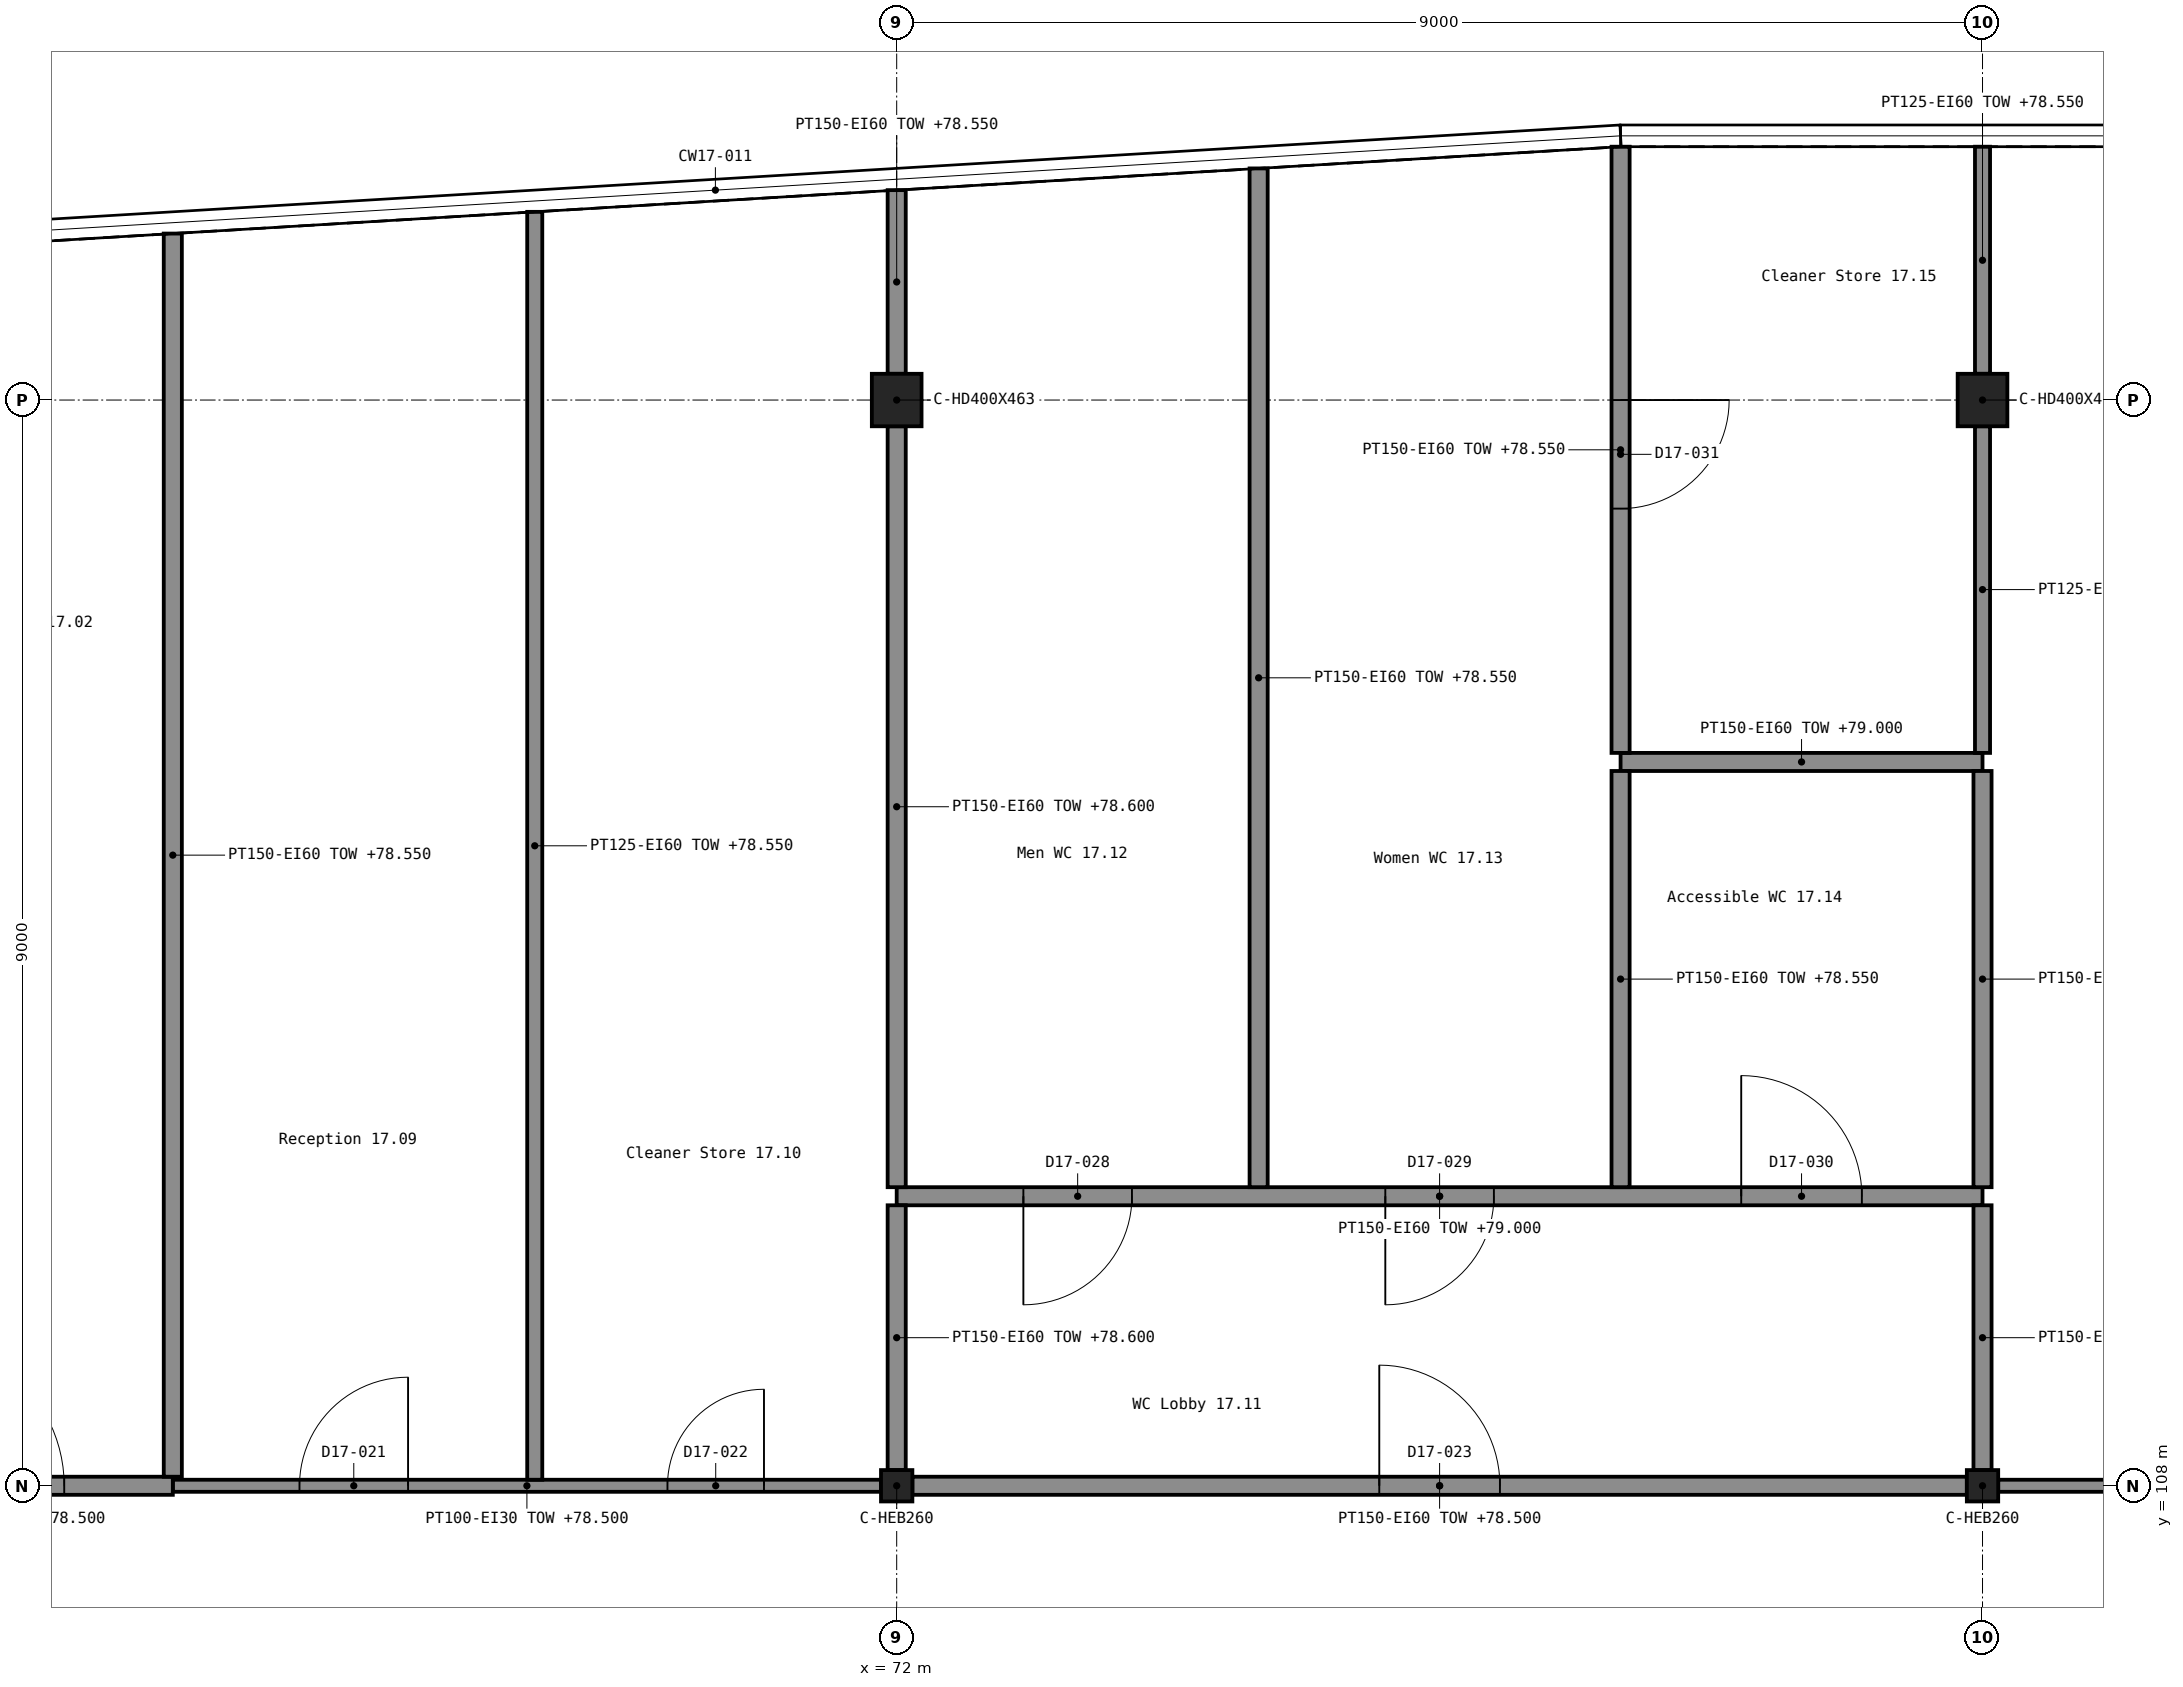
"""IFC4 building model, lengths in metres.
Left out: names, types, materials, properties, quantities, classifications, styles, units other than length and angle.
Written with IfcOpenShell. Run it as: python <this file> out.ifc"""

import sys

from ifc_helpers import new_model, si_unit, direction, frame, frame_2d, origin, origin_2d, place, context, subcontext, project, spatial, rectangle, i_section, extrude, element, fill, save


model = new_model("IFC4")
c1 = context("Model", 3, precision=1e-05, world=origin(), true_north=direction((0.0, 1.0)))
c2 = subcontext(c1, "Body", "Model", "MODEL_VIEW")
j1 = project(units=[si_unit("LENGTHUNIT", "METRE"), si_unit("PLANEANGLEUNIT", "RADIAN")], contexts=[c1])
p1 = place(None, origin())
s1 = spatial("IfcSite", under=j1, at=p1, CompositionType="ELEMENT")
p2 = place(p1, origin())
s2 = spatial("IfcBuilding", under=s1, at=p2, CompositionType="ELEMENT")
p3 = place(p2, frame((0.0, 0.0, 75.3)))
s3 = spatial("IfcBuildingStorey", under=s2, at=p3, CompositionType="ELEMENT", Elevation=75.3)
for number, where, z_axis, x_axis in (
    (1, (72.0, 108.0, 0.0), (0.0, 0.0, 1.0), (1.0, 0.0, 0.0)),
    (2, (81.0, 108.0, 0.0), (0.0, 0.0, 1.0), (1.0, 0.0, 0.0)),
):
    element("IfcColumn", number, at=place(p3, frame(where, z_axis=z_axis, x_axis=x_axis)), inside=s3, PredefinedType="COLUMN", context=c2, shape_type="SweptSolid", body=[
        extrude(i_section(OverallWidth=0.26, OverallDepth=0.26, WebThickness=0.01, FlangeThickness=0.018, FilletRadius=0.024, at=origin_2d()), origin(), (0.0, 0.0, 1.0), 3.9),
    ])
for number, where, z_axis, x_axis in (
    (3, (72.0, 117.0, 0.0), (0.0, 0.0, 1.0), (1.0, 0.0, 0.0)),
    (4, (81.0, 117.0, 0.0), (0.0, 0.0, 1.0), (1.0, 0.0, 0.0)),
):
    element("IfcColumn", number, at=place(p3, frame(where, z_axis=z_axis, x_axis=x_axis)), inside=s3, PredefinedType="COLUMN", context=c2, shape_type="SweptSolid", body=[
        extrude(i_section(OverallWidth=0.412, OverallDepth=0.435, WebThickness=0.036, FlangeThickness=0.057, FilletRadius=0.015, at=origin_2d()), origin(), (0.0, 0.0, 1.0), 3.9),
    ])
p4 = place(p3, frame((83.999, 118.975, 3.9), z_axis=(0.0, 0.0, 1.0), x_axis=(-1.0, 0.0, 0.0)))
e5 = element("IfcWall", 5, at=p4, inside=s3, PredefinedType="PARAPET", context=c2, shape_type="SweptSolid", body=[
    extrude(rectangle(XDim=2.999, YDim=0.25, at=frame_2d((1.5, 0.0))), origin(), (0.0, 0.0, 1.0), 2.9),
])
p5 = place(p3, frame((80.999, 118.975, 3.9), z_axis=(0.0, 0.0, 1.0), x_axis=(-1.0, 0.0, 0.0)))
e6 = element("IfcWall", 6, at=p5, inside=s3, PredefinedType="PARAPET", context=c2, shape_type="SweptSolid", body=[
    extrude(rectangle(XDim=2.999, YDim=0.25, at=frame_2d((1.5, 0.0))), origin(), (0.0, 0.0, 1.0), 3.3),
])
p6 = place(p3, frame((78.004, 118.975, 3.9), z_axis=(0.0, 0.0, 1.0), x_axis=(-0.998203971819, -0.059906849736, 0.0)))
e7 = element("IfcWall", 7, at=p6, inside=s3, PredefinedType="PARAPET", context=c2, shape_type="SweptSolid", body=[
    extrude(rectangle(XDim=3.008, YDim=0.25, at=frame_2d((1.504, 0.0))), origin(), (0.0, 0.0, 1.0), 3.5),
])
p7 = place(p3, frame((75.001, 118.795, 3.9), z_axis=(0.0, 0.0, 1.0), x_axis=(-0.998203971819, -0.059906849736, 0.0)))
e8 = element("IfcWall", 8, at=p7, inside=s3, PredefinedType="PARAPET", context=c2, shape_type="SweptSolid", body=[
    extrude(rectangle(XDim=3.008, YDim=0.25, at=frame_2d((1.504, 0.0))), origin(), (0.0, 0.0, 1.0), 3.6),
])
p8 = place(p3, frame((71.999, 118.615, 3.9), z_axis=(0.0, 0.0, 1.0), x_axis=(-0.998203971819, -0.059906849736, 0.0)))
e9 = element("IfcWall", 9, at=p8, inside=s3, PredefinedType="PARAPET", context=c2, shape_type="SweptSolid", body=[
    extrude(rectangle(XDim=3.008, YDim=0.25, at=frame_2d((1.504, 0.0))), origin(), (0.0, 0.0, 1.0), 3.4),
])
p9 = place(p3, frame((68.997, 118.435, 3.9), z_axis=(0.0, 0.0, 1.0), x_axis=(-0.998203971819, -0.059906849736, 0.0)))
e10 = element("IfcWall", 10, at=p9, inside=s3, PredefinedType="PARAPET", context=c2, shape_type="SweptSolid", body=[
    extrude(rectangle(XDim=3.008, YDim=0.25, at=frame_2d((1.504, 0.0))), origin(), (0.0, 0.0, 1.0), 3.1),
])
p10 = place(p3, frame((65.995, 118.254, 3.9), z_axis=(0.0, 0.0, 1.0), x_axis=(-0.998208822746, -0.059825965875, 0.0)))
e11 = element("IfcWall", 11, at=p10, inside=s3, PredefinedType="PARAPET", context=c2, shape_type="SweptSolid", body=[
    extrude(rectangle(XDim=3.008, YDim=0.25, at=frame_2d((1.504, 0.0))), origin(), (0.0, 0.0, 1.0), 2.6),
])
p11 = place(p3, frame((66.0, 108.0, 0.0), z_axis=(0.0, 0.0, 1.0), x_axis=(1.0, 0.0, 0.0)))
e12 = element("IfcWall", 12, at=p11, inside=s3, PredefinedType="PARTITIONING", context=c2, shape_type="SweptSolid", body=[
    extrude(rectangle(XDim=5.87, YDim=0.1, at=frame_2d((2.935, 0.0))), origin(), (0.0, 0.0, 1.0), 3.2),
])
p12 = place(p11, frame((1.05, 0.0, 0.0)))
e13 = element("IfcOpeningElement", 13, at=p12, cuts=e12, PredefinedType="OPENING", context=c2, shape_type="SweptSolid", body=[
    extrude(rectangle(XDim=0.9, YDim=2.1, at=frame_2d((0.45, 1.05))), frame((0.0, 0.061, 0.0), z_axis=(0.0, -1.0, 0.0), x_axis=(1.0, 0.0, 0.0)), (0.0, 0.0, 1.0), 0.122),
])
p13 = place(p11, frame((4.1, 0.0, 0.0)))
e14 = element("IfcOpeningElement", 14, at=p13, cuts=e12, PredefinedType="OPENING", context=c2, shape_type="SweptSolid", body=[
    extrude(rectangle(XDim=0.8, YDim=2.1, at=frame_2d((0.4, 1.05))), frame((0.0, 0.061, 0.0), z_axis=(0.0, -1.0, 0.0), x_axis=(1.0, 0.0, 0.0)), (0.0, 0.0, 1.0), 0.122),
])
p14 = place(p3, frame((81.13, 108.0, 0.0), z_axis=(0.0, 0.0, 1.0), x_axis=(1.0, 0.0, 0.0)))
e15 = element("IfcWall", 15, at=p14, inside=s3, PredefinedType="PARTITIONING", context=c2, shape_type="SweptSolid", body=[
    extrude(rectangle(XDim=8.74, YDim=0.1, at=frame_2d((4.37, 0.0))), origin(), (0.0, 0.0, 1.0), 3.2),
])
p15 = place(p14, frame((5.845, 0.0, 0.0)))
e16 = element("IfcOpeningElement", 16, at=p15, cuts=e15, PredefinedType="OPENING", context=c2, shape_type="SweptSolid", body=[
    extrude(rectangle(XDim=1.8, YDim=2.1, at=frame_2d((0.9, 1.05))), frame((0.0, 0.061, 0.0), z_axis=(0.0, -1.0, 0.0), x_axis=(1.0, 0.0, 0.0)), (0.0, 0.0, 1.0), 0.122),
])
p16 = place(p3, frame((63.2, 108.0, 0.0), z_axis=(0.0, 0.0, 1.0), x_axis=(1.0, 0.0, 0.0)))
e17 = element("IfcWall", 17, at=p16, inside=s3, PredefinedType="PARTITIONING", context=c2, shape_type="SweptSolid", body=[
    extrude(rectangle(XDim=2.8, YDim=0.15, at=frame_2d((1.4, 0.0))), origin(), (0.0, 0.0, 1.0), 3.2),
])
p17 = place(p16, frame((0.7, 0.0, 0.0)))
e18 = element("IfcOpeningElement", 18, at=p17, cuts=e17, PredefinedType="OPENING", context=c2, shape_type="SweptSolid", body=[
    extrude(rectangle(XDim=1.2, YDim=2.1, at=frame_2d((0.6, 1.05))), frame((0.0, 0.086, 0.0), z_axis=(0.0, -1.0, 0.0), x_axis=(1.0, 0.0, 0.0)), (0.0, 0.0, 1.0), 0.172),
])
p18 = place(p3, frame((72.13, 108.0, 0.0), z_axis=(0.0, 0.0, 1.0), x_axis=(1.0, 0.0, 0.0)))
e19 = element("IfcWall", 19, at=p18, inside=s3, PredefinedType="PARTITIONING", context=c2, shape_type="SweptSolid", body=[
    extrude(rectangle(XDim=8.74, YDim=0.15, at=frame_2d((4.37, 0.0))), origin(), (0.0, 0.0, 1.0), 3.2),
])
p19 = place(p18, frame((3.87, 0.0, 0.0)))
e20 = element("IfcOpeningElement", 20, at=p19, cuts=e19, PredefinedType="OPENING", context=c2, shape_type="SweptSolid", body=[
    extrude(rectangle(XDim=1.0, YDim=2.1, at=frame_2d((0.5, 1.05))), frame((0.0, 0.086, 0.0), z_axis=(0.0, -1.0, 0.0), x_axis=(1.0, 0.0, 0.0)), (0.0, 0.0, 1.0), 0.172),
])
p20 = place(p3, frame((72.0, 110.4, 0.0), z_axis=(0.0, 0.0, 1.0), x_axis=(1.0, 0.0, 0.0)))
e21 = element("IfcWall", 21, at=p20, inside=s3, PredefinedType="PARTITIONING", context=c2, shape_type="SweptSolid", body=[
    extrude(rectangle(XDim=9.0, YDim=0.15, at=frame_2d((4.5, 0.0))), origin(), (0.0, 0.0, 1.0), 3.7),
])
p21 = place(p20, frame((1.05, 0.0, 0.0)))
e22 = element("IfcOpeningElement", 22, at=p21, cuts=e21, PredefinedType="OPENING", context=c2, shape_type="SweptSolid", body=[
    extrude(rectangle(XDim=0.9, YDim=2.1, at=frame_2d((0.45, 1.05))), frame((0.0, 0.086, 0.0), z_axis=(0.0, -1.0, 0.0), x_axis=(1.0, 0.0, 0.0)), (0.0, 0.0, 1.0), 0.172),
])
p22 = place(p20, frame((4.05, 0.0, 0.0)))
e23 = element("IfcOpeningElement", 23, at=p22, cuts=e21, PredefinedType="OPENING", context=c2, shape_type="SweptSolid", body=[
    extrude(rectangle(XDim=0.9, YDim=2.1, at=frame_2d((0.45, 1.05))), frame((0.0, 0.086, 0.0), z_axis=(0.0, -1.0, 0.0), x_axis=(1.0, 0.0, 0.0)), (0.0, 0.0, 1.0), 0.172),
])
p23 = place(p20, frame((7.0, 0.0, 0.0)))
e24 = element("IfcOpeningElement", 24, at=p23, cuts=e21, PredefinedType="OPENING", context=c2, shape_type="SweptSolid", body=[
    extrude(rectangle(XDim=1.0, YDim=2.1, at=frame_2d((0.5, 1.05))), frame((0.0, 0.086, 0.0), z_axis=(0.0, -1.0, 0.0), x_axis=(1.0, 0.0, 0.0)), (0.0, 0.0, 1.0), 0.172),
])
p24 = place(p3, frame((78.0, 114.0, 0.0), z_axis=(0.0, 0.0, 1.0), x_axis=(1.0, 0.0, 0.0)))
e25 = element("IfcWall", 25, at=p24, inside=s3, PredefinedType="PARTITIONING", context=c2, shape_type="SweptSolid", body=[
    extrude(rectangle(XDim=3.0, YDim=0.15, at=frame_2d((1.5, 0.0))), origin(), (0.0, 0.0, 1.0), 3.7),
])
p25 = place(p3, frame((66.0, 108.075, 0.0), z_axis=(0.0, 0.0, 1.0), x_axis=(0.0, 1.0, 0.0)))
e26 = element("IfcWall", 26, at=p25, inside=s3, PredefinedType="PARTITIONING", context=c2, shape_type="SweptSolid", body=[
    extrude(rectangle(XDim=10.305, YDim=0.15, at=frame_2d((5.152, 0.0))), origin(), (0.0, 0.0, 1.0), 3.25),
])
p26 = place(p3, frame((69.0, 108.05, 0.0), z_axis=(0.0, 0.0, 1.0), x_axis=(0.0, 1.0, 0.0)))
e27 = element("IfcWall", 27, at=p26, inside=s3, PredefinedType="PARTITIONING", context=c2, shape_type="SweptSolid", body=[
    extrude(rectangle(XDim=10.51, YDim=0.125, at=frame_2d((5.255, 0.0))), origin(), (0.0, 0.0, 1.0), 3.25),
])
p27 = place(p3, frame((72.0, 108.13, 0.0), z_axis=(0.0, 0.0, 1.0), x_axis=(0.0, 1.0, 0.0)))
e28 = element("IfcWall", 28, at=p27, inside=s3, PredefinedType="PARTITIONING", context=c2, shape_type="SweptSolid", body=[
    extrude(rectangle(XDim=2.195, YDim=0.15, at=frame_2d((1.098, 0.0))), origin(), (0.0, 0.0, 1.0), 3.3),
])
p28 = place(p3, frame((72.0, 110.475, 0.0), z_axis=(0.0, 0.0, 1.0), x_axis=(0.0, 1.0, 0.0)))
e29 = element("IfcWall", 29, at=p28, inside=s3, PredefinedType="PARTITIONING", context=c2, shape_type="SweptSolid", body=[
    extrude(rectangle(XDim=6.307, YDim=0.15, at=frame_2d((3.154, 0.0))), origin(), (0.0, 0.0, 1.0), 3.3),
])
p29 = place(p3, frame((72.0, 117.218, 0.0), z_axis=(0.0, 0.0, 1.0), x_axis=(0.0, 1.0, 0.0)))
e30 = element("IfcWall", 30, at=p29, inside=s3, PredefinedType="PARTITIONING", context=c2, shape_type="SweptSolid", body=[
    extrude(rectangle(XDim=1.522, YDim=0.15, at=frame_2d((0.761, 0.0))), origin(), (0.0, 0.0, 1.0), 3.25),
])
p30 = place(p3, frame((75.0, 110.475, 0.0), z_axis=(0.0, 0.0, 1.0), x_axis=(0.0, 1.0, 0.0)))
e31 = element("IfcWall", 31, at=p30, inside=s3, PredefinedType="PARTITIONING", context=c2, shape_type="SweptSolid", body=[
    extrude(rectangle(XDim=8.445, YDim=0.15, at=frame_2d((4.222, 0.0))), origin(), (0.0, 0.0, 1.0), 3.25),
])
p31 = place(p3, frame((78.0, 110.475, 0.0), z_axis=(0.0, 0.0, 1.0), x_axis=(0.0, 1.0, 0.0)))
e32 = element("IfcWall", 32, at=p31, inside=s3, PredefinedType="PARTITIONING", context=c2, shape_type="SweptSolid", body=[
    extrude(rectangle(XDim=3.45, YDim=0.15, at=frame_2d((1.725, 0.0))), origin(), (0.0, 0.0, 1.0), 3.25),
])
p32 = place(p3, frame((78.0, 114.075, 0.0), z_axis=(0.0, 0.0, 1.0), x_axis=(0.0, 1.0, 0.0)))
e33 = element("IfcWall", 33, at=p32, inside=s3, PredefinedType="PARTITIONING", context=c2, shape_type="SweptSolid", body=[
    extrude(rectangle(XDim=5.025, YDim=0.15, at=frame_2d((2.513, 0.0))), origin(), (0.0, 0.0, 1.0), 3.25),
])
p33 = place(p32, frame((2.025, 0.0, 0.0)))
e34 = element("IfcOpeningElement", 34, at=p33, cuts=e33, PredefinedType="OPENING", context=c2, shape_type="SweptSolid", body=[
    extrude(rectangle(XDim=0.9, YDim=2.1, at=frame_2d((0.45, 1.05))), frame((0.0, 0.086, 0.0), z_axis=(0.0, -1.0, 0.0), x_axis=(1.0, 0.0, 0.0)), (0.0, 0.0, 1.0), 0.172),
])
p34 = place(p3, frame((81.0, 114.075, 0.0), z_axis=(0.0, 0.0, 1.0), x_axis=(0.0, 1.0, 0.0)))
e35 = element("IfcWall", 35, at=p34, inside=s3, PredefinedType="PARTITIONING", context=c2, shape_type="SweptSolid", body=[
    extrude(rectangle(XDim=2.708, YDim=0.125, at=frame_2d((1.354, 0.0))), origin(), (0.0, 0.0, 1.0), 3.3),
])
p35 = place(p3, frame((81.0, 117.218, 0.0), z_axis=(0.0, 0.0, 1.0), x_axis=(0.0, 1.0, 0.0)))
e36 = element("IfcWall", 36, at=p35, inside=s3, PredefinedType="PARTITIONING", context=c2, shape_type="SweptSolid", body=[
    extrude(rectangle(XDim=1.883, YDim=0.125, at=frame_2d((0.941, 0.0))), origin(), (0.0, 0.0, 1.0), 3.25),
])
p36 = place(p3, frame((81.0, 108.13, 0.0), z_axis=(0.0, 0.0, 1.0), x_axis=(0.0, 1.0, 0.0)))
e37 = element("IfcWall", 37, at=p36, inside=s3, PredefinedType="PARTITIONING", context=c2, shape_type="SweptSolid", body=[
    extrude(rectangle(XDim=2.195, YDim=0.15, at=frame_2d((1.098, 0.0))), origin(), (0.0, 0.0, 1.0), 3.3),
])
p37 = place(p3, frame((81.0, 110.475, 0.0), z_axis=(0.0, 0.0, 1.0), x_axis=(0.0, 1.0, 0.0)))
e38 = element("IfcWall", 38, at=p37, inside=s3, PredefinedType="PARTITIONING", context=c2, shape_type="SweptSolid", body=[
    extrude(rectangle(XDim=3.45, YDim=0.15, at=frame_2d((1.725, 0.0))), origin(), (0.0, 0.0, 1.0), 3.3),
])
p38 = place(p17, origin())
e39 = element("IfcDoor", 39, at=p38, inside=s3, OperationType="SINGLE_SWING_LEFT", PredefinedType="DOOR", context=c2, shape_type="SweptSolid", body=[
    extrude(rectangle(XDim=1.2, YDim=2.1, at=frame_2d((0.6, 1.05))), frame((0.0, 0.025, 0.0), z_axis=(0.0, -1.0, 0.0), x_axis=(1.0, 0.0, 0.0)), (0.0, 0.0, 1.0), 0.05),
])
fill(e18, e39)
p39 = place(p12, origin())
e40 = element("IfcDoor", 40, at=p39, inside=s3, OperationType="SINGLE_SWING_RIGHT", PredefinedType="DOOR", context=c2, shape_type="SweptSolid", body=[
    extrude(rectangle(XDim=0.9, YDim=2.1, at=frame_2d((0.45, 1.05))), frame((0.0, 0.025, 0.0), z_axis=(0.0, -1.0, 0.0), x_axis=(1.0, 0.0, 0.0)), (0.0, 0.0, 1.0), 0.05),
])
fill(e13, e40)
p40 = place(p13, origin())
e41 = element("IfcDoor", 41, at=p40, inside=s3, OperationType="SINGLE_SWING_RIGHT", PredefinedType="DOOR", context=c2, shape_type="SweptSolid", body=[
    extrude(rectangle(XDim=0.8, YDim=2.1, at=frame_2d((0.4, 1.05))), frame((0.0, 0.025, 0.0), z_axis=(0.0, -1.0, 0.0), x_axis=(1.0, 0.0, 0.0)), (0.0, 0.0, 1.0), 0.05),
])
fill(e14, e41)
p41 = place(p19, origin())
e42 = element("IfcDoor", 42, at=p41, inside=s3, OperationType="SINGLE_SWING_LEFT", PredefinedType="DOOR", context=c2, shape_type="SweptSolid", body=[
    extrude(rectangle(XDim=1.0, YDim=2.1, at=frame_2d((0.5, 1.05))), frame((0.0, 0.025, 0.0), z_axis=(0.0, -1.0, 0.0), x_axis=(1.0, 0.0, 0.0)), (0.0, 0.0, 1.0), 0.05),
])
fill(e20, e42)
p42 = place(p21, frame((0.9, 0.0, 0.0), z_axis=(0.0, 0.0, 1.0), x_axis=(-1.0, 0.0, 0.0)))
e43 = element("IfcDoor", 43, at=p42, inside=s3, OperationType="SINGLE_SWING_RIGHT", PredefinedType="DOOR", context=c2, shape_type="SweptSolid", body=[
    extrude(rectangle(XDim=0.9, YDim=2.1, at=frame_2d((0.45, 1.05))), frame((0.0, 0.025, 0.0), z_axis=(0.0, -1.0, 0.0), x_axis=(1.0, 0.0, 0.0)), (0.0, 0.0, 1.0), 0.05),
])
fill(e22, e43)
p43 = place(p22, frame((0.9, 0.0, 0.0), z_axis=(0.0, 0.0, 1.0), x_axis=(-1.0, 0.0, 0.0)))
e44 = element("IfcDoor", 44, at=p43, inside=s3, OperationType="SINGLE_SWING_RIGHT", PredefinedType="DOOR", context=c2, shape_type="SweptSolid", body=[
    extrude(rectangle(XDim=0.9, YDim=2.1, at=frame_2d((0.45, 1.05))), frame((0.0, 0.025, 0.0), z_axis=(0.0, -1.0, 0.0), x_axis=(1.0, 0.0, 0.0)), (0.0, 0.0, 1.0), 0.05),
])
fill(e23, e44)
p44 = place(p23, origin())
e45 = element("IfcDoor", 45, at=p44, inside=s3, OperationType="SINGLE_SWING_LEFT", PredefinedType="DOOR", context=c2, shape_type="SweptSolid", body=[
    extrude(rectangle(XDim=1.0, YDim=2.1, at=frame_2d((0.5, 1.05))), frame((0.0, 0.025, 0.0), z_axis=(0.0, -1.0, 0.0), x_axis=(1.0, 0.0, 0.0)), (0.0, 0.0, 1.0), 0.05),
])
fill(e24, e45)
p45 = place(p33, frame((0.9, 0.0, 0.0), z_axis=(0.0, 0.0, 1.0), x_axis=(-1.0, 0.0, 0.0)))
e46 = element("IfcDoor", 46, at=p45, inside=s3, OperationType="SINGLE_SWING_LEFT", PredefinedType="DOOR", context=c2, shape_type="SweptSolid", body=[
    extrude(rectangle(XDim=0.9, YDim=2.1, at=frame_2d((0.45, 1.05))), frame((0.0, 0.025, 0.0), z_axis=(0.0, -1.0, 0.0), x_axis=(1.0, 0.0, 0.0)), (0.0, 0.0, 1.0), 0.05),
])
fill(e34, e46)
save(model, sys.argv[1])
